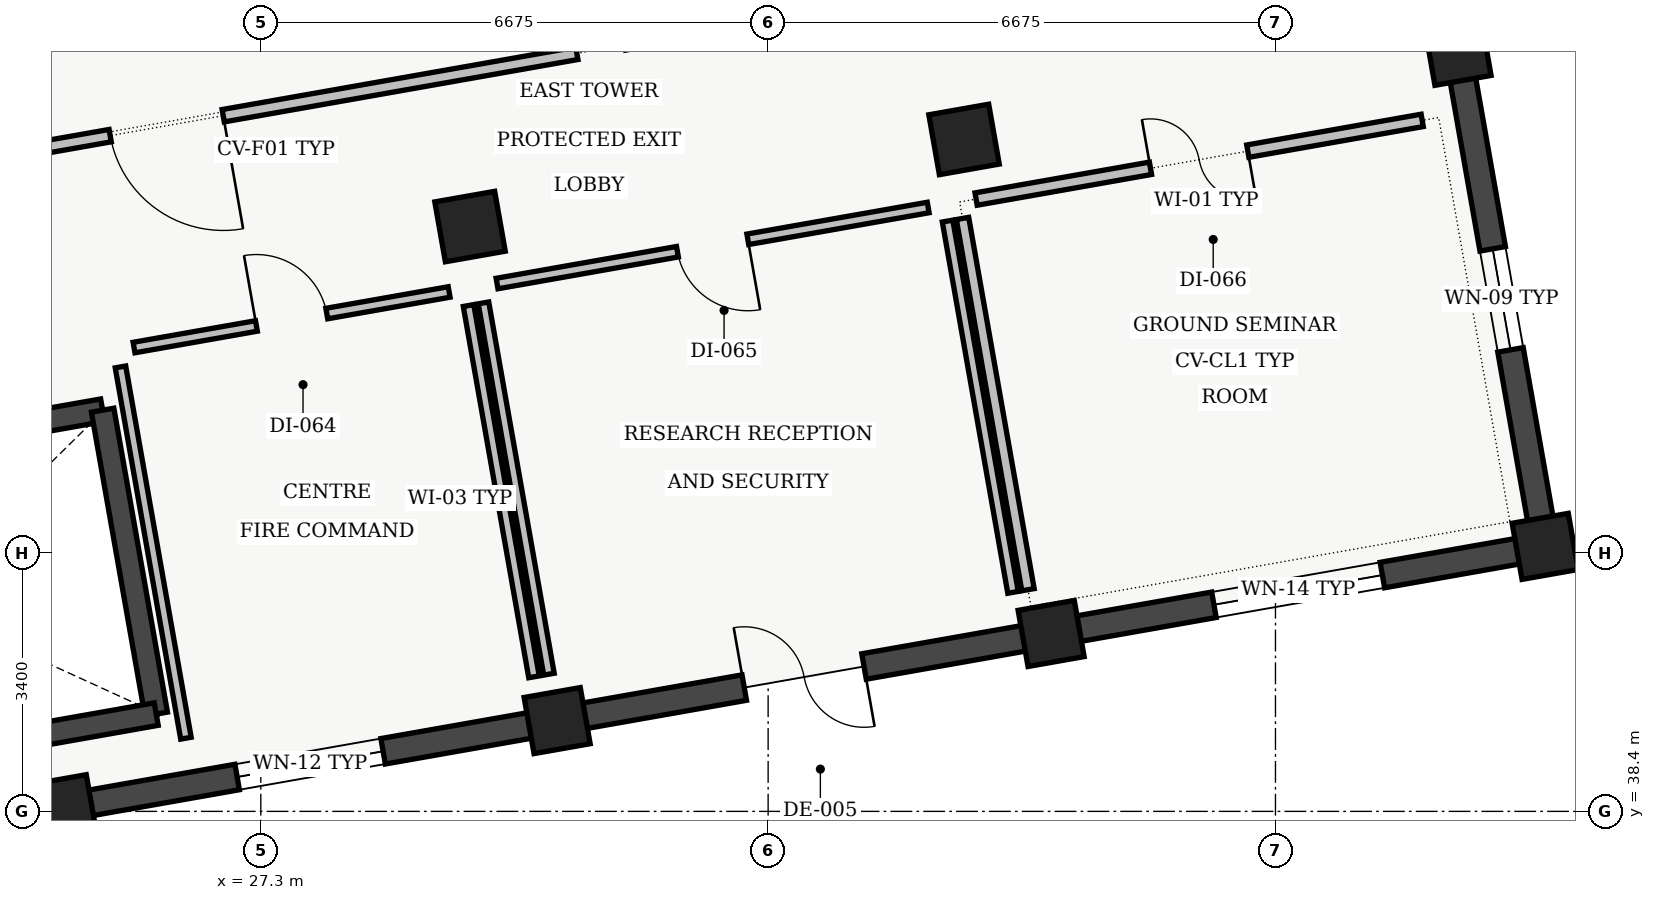
"""IFC4 building model, lengths in metres.
Left out: names, types, materials, properties, quantities, classifications, styles, units other than length and angle.
Written with IfcOpenShell. Run it as: python <this file> out.ifc"""

import sys

from ifc_helpers import new_model, si_unit, direction, frame, frame_2d, origin, origin_2d, place, context, subcontext, project, spatial, rectangle, extrude, element, fill, save


model = new_model("IFC4")
c1 = context("Model", 3, precision=1e-05, world=origin(), true_north=direction((0.0, 1.0)))
c2 = subcontext(c1, "Body", "Model", "MODEL_VIEW")
j1 = project(units=[si_unit("LENGTHUNIT", "METRE"), si_unit("PLANEANGLEUNIT", "RADIAN")], contexts=[c1])
p1 = place(None, origin())
s1 = spatial("IfcSite", under=j1, at=p1, CompositionType="ELEMENT")
p2 = place(p1, origin())
s2 = spatial("IfcBuilding", under=s1, at=p2, CompositionType="ELEMENT")
p3 = place(p2, origin())
s3 = spatial("IfcBuildingStorey", under=s2, at=p3, CompositionType="ELEMENT", Elevation=0.0)
for number, where, z_axis, x_axis in (
    (1, (24.699, 38.448, 0.0), (0.0, 0.0, 1.0), (0.985, 0.174, 0.0)),
    (2, (31.199, 39.594, 0.0), (0.0, 0.0, 1.0), (0.985, 0.174, 0.0)),
):
    element("IfcColumn", number, at=place(p3, frame(where, z_axis=z_axis, x_axis=x_axis)), inside=s3, PredefinedType="COLUMN", context=c2, shape_type="SweptSolid", body=[
        extrude(rectangle(XDim=0.75, YDim=0.75, at=origin_2d()), origin(), (0.0, 0.0, 1.0), 4.92),
    ])
p4 = place(p3, frame((30.053, 46.094, 0.0), z_axis=(0.0, 0.0, 1.0), x_axis=(0.984807753012, 0.173648177667, 0.0)))
e3 = element("IfcColumn", 3, at=p4, inside=s3, PredefinedType="COLUMN", context=c2, shape_type="SweptSolid", body=[
    extrude(rectangle(XDim=0.8, YDim=0.8, at=origin_2d()), origin(), (0.0, 0.0, 1.0), 4.92),
])
p5 = place(p3, frame((37.699, 40.74, 0.0), z_axis=(0.0, 0.0, 1.0), x_axis=(0.984807753012, 0.173648177667, 0.0)))
e4 = element("IfcColumn", 4, at=p5, inside=s3, PredefinedType="COLUMN", context=c2, shape_type="SweptSolid", body=[
    extrude(rectangle(XDim=0.75, YDim=0.75, at=origin_2d()), origin(), (0.0, 0.0, 1.0), 4.92),
])
p6 = place(p3, frame((36.552, 47.24, 0.0), z_axis=(0.0, 0.0, 1.0), x_axis=(0.984807753012, 0.173648177667, 0.0)))
e5 = element("IfcColumn", 5, at=p6, inside=s3, PredefinedType="COLUMN", context=c2, shape_type="SweptSolid", body=[
    extrude(rectangle(XDim=0.8, YDim=0.8, at=origin_2d()), origin(), (0.0, 0.0, 1.0), 4.92),
])
for number, where, z_axis, x_axis in (
    (6, (44.198, 41.886, 0.0), (0.0, 0.0, 1.0), (0.985, 0.174, 0.0)),
    (7, (43.052, 48.386, 0.0), (0.0, 0.0, 1.0), (0.985, 0.174, 0.0)),
):
    element("IfcColumn", number, at=place(p3, frame(where, z_axis=z_axis, x_axis=x_axis)), inside=s3, PredefinedType="COLUMN", context=c2, shape_type="SweptSolid", body=[
        extrude(rectangle(XDim=0.75, YDim=0.75, at=origin_2d()), origin(), (0.0, 0.0, 1.0), 4.92),
    ])
p7 = place(p3, frame((43.116, 48.022, 0.0), z_axis=(0.0, 0.0, 1.0), x_axis=(0.1736474839, -0.984807875342, 0.0)))
e8 = element("IfcWall", 8, at=p7, inside=s3, PredefinedType="SOLIDWALL", context=c2, shape_type="SweptSolid", body=[
    extrude(rectangle(XDim=5.86, YDim=0.34, at=frame_2d((2.93, 0.0))), origin(), (0.0, 0.0, 1.0), 4.455),
])
p8 = place(p7, frame((2.255, 0.0, 0.95)))
e9 = element("IfcOpeningElement", 9, at=p8, cuts=e8, PredefinedType="OPENING", context=c2, shape_type="SweptSolid", body=[
    extrude(rectangle(XDim=1.35, YDim=1.8, at=frame_2d((0.675, 0.9))), frame((0.0, 0.17, 0.0), z_axis=(0.0, -1.0, 0.0), x_axis=(1.0, 0.0, 0.0)), (0.0, 0.0, 1.0), 0.34),
])
p9 = place(p3, frame((43.834, 41.822, 0.0), z_axis=(0.0, 0.0, 1.0), x_axis=(-0.984807875342, -0.1736474839, 0.0)))
e10 = element("IfcWall", 10, at=p9, inside=s3, PredefinedType="SOLIDWALL", context=c2, shape_type="SweptSolid", body=[
    extrude(rectangle(XDim=5.86, YDim=0.34, at=frame_2d((2.93, 0.0))), origin(), (0.0, 0.0, 1.0), 4.455),
])
p10 = place(p9, frame((1.805, 0.0, 0.95)))
e11 = element("IfcOpeningElement", 11, at=p10, cuts=e10, PredefinedType="OPENING", context=c2, shape_type="SweptSolid", body=[
    extrude(rectangle(XDim=2.25, YDim=1.55, at=frame_2d((1.125, 0.775))), frame((0.0, 0.17, 0.0), z_axis=(0.0, -1.0, 0.0), x_axis=(1.0, 0.0, 0.0)), (0.0, 0.0, 1.0), 0.34),
])
p11 = place(p3, frame((37.334, 40.676, 0.0), z_axis=(0.0, 0.0, 1.0), x_axis=(-0.984807875342, -0.1736474839, 0.0)))
e12 = element("IfcWall", 12, at=p11, inside=s3, PredefinedType="SOLIDWALL", context=c2, shape_type="SweptSolid", body=[
    extrude(rectangle(XDim=5.86, YDim=0.34, at=frame_2d((2.93, 0.0))), origin(), (0.0, 0.0, 1.0), 4.455),
])
p12 = place(p11, frame((2.13, 0.0, 0.0)))
e13 = element("IfcOpeningElement", 13, at=p12, cuts=e12, PredefinedType="OPENING", context=c2, shape_type="SweptSolid", body=[
    extrude(rectangle(XDim=1.6, YDim=2.2, at=frame_2d((0.8, 1.1))), frame((0.0, 0.17, 0.0), z_axis=(0.0, -1.0, 0.0), x_axis=(1.0, 0.0, 0.0)), (0.0, 0.0, 1.0), 0.34),
])
p13 = place(p3, frame((30.834, 39.53, 0.0), z_axis=(0.0, 0.0, 1.0), x_axis=(-0.984807875342, -0.1736474839, 0.0)))
e14 = element("IfcWall", 14, at=p13, inside=s3, PredefinedType="SOLIDWALL", context=c2, shape_type="SweptSolid", body=[
    extrude(rectangle(XDim=5.86, YDim=0.34, at=frame_2d((2.93, 0.0))), origin(), (0.0, 0.0, 1.0), 4.455),
])
p14 = place(p13, frame((1.955, 0.0, 0.95)))
e15 = element("IfcOpeningElement", 15, at=p14, cuts=e14, PredefinedType="OPENING", context=c2, shape_type="SweptSolid", body=[
    extrude(rectangle(XDim=1.95, YDim=1.5, at=frame_2d((0.975, 0.75))), frame((0.0, 0.17, 0.0), z_axis=(0.0, -1.0, 0.0), x_axis=(1.0, 0.0, 0.0)), (0.0, 0.0, 1.0), 0.34),
])
p15 = place(p3, frame((17.863, 42.381, 0.0), z_axis=(0.0, 0.0, 1.0), x_axis=(0.984808225754, 0.173645496596, 0.0)))
e16 = element("IfcWall", 16, at=p15, inside=s3, PredefinedType="SHEAR", context=c2, shape_type="SweptSolid", body=[
    extrude(rectangle(XDim=7.47, YDim=0.3, at=frame_2d((3.735, 0.0))), origin(), (0.0, 0.0, 1.0), 4.88),
])
p16 = place(p15, frame((0.18, 0.0, 0.0)))
e17 = element("IfcOpeningElement", 17, at=p16, cuts=e16, PredefinedType="OPENING", context=c2, shape_type="SweptSolid", body=[
    extrude(rectangle(XDim=1.24, YDim=2.15, at=frame_2d((0.62, 1.075))), frame((0.0, 0.15, 0.0), z_axis=(0.0, -1.0, 0.0), x_axis=(1.0, 0.0, 0.0)), (0.0, 0.0, 1.0), 0.3),
])
p17 = place(p3, frame((25.219, 43.678, 0.0), z_axis=(0.0, 0.0, 1.0), x_axis=(0.173665267602, -0.984804739443, 0.0)))
e18 = element("IfcWall", 18, at=p17, inside=s3, PredefinedType="SHEAR", context=c2, shape_type="SweptSolid", body=[
    extrude(rectangle(XDim=4.06, YDim=0.3, at=frame_2d((2.03, 0.0))), origin(), (0.0, 0.0, 1.0), 4.88),
])
p18 = place(p3, frame((25.924, 39.68, 0.0), z_axis=(0.0, 0.0, 1.0), x_axis=(-0.984809211193, -0.173639907711, 0.0)))
e19 = element("IfcWall", 19, at=p18, inside=s3, PredefinedType="SHEAR", context=c2, shape_type="SweptSolid", body=[
    extrude(rectangle(XDim=7.47, YDim=0.3, at=frame_2d((3.735, 0.0))), origin(), (0.0, 0.0, 1.0), 4.88),
])
p19 = place(p3, frame((30.894, 40.17, 0.0), z_axis=(0.0, 0.0, 1.0), x_axis=(-0.173658971256, 0.98480584975, 0.0)))
e20 = element("IfcWall", 20, at=p19, inside=s3, PredefinedType="PARTITIONING", context=c2, shape_type="SweptSolid", body=[
    extrude(rectangle(XDim=4.96, YDim=0.14, at=frame_2d((2.48, 0.0))), origin(), (0.0, 0.0, 1.0), 4.255),
])
p20 = place(p3, frame((29.778, 45.233, 0.0), z_axis=(0.0, 0.0, 1.0), x_axis=(-0.984811568751, -0.173626536147, 0.0)))
e21 = element("IfcWall", 21, at=p20, inside=s3, PredefinedType="PARTITIONING", context=c2, shape_type="SweptSolid", body=[
    extrude(rectangle(XDim=4.21, YDim=0.14, at=frame_2d((2.105, 0.0))), origin(), (0.0, 0.0, 1.0), 4.55),
])
p21 = place(p20, frame((1.635, 0.0, 0.0)))
e22 = element("IfcOpeningElement", 22, at=p21, cuts=e21, PredefinedType="OPENING", context=c2, shape_type="SweptSolid", body=[
    extrude(rectangle(XDim=0.94, YDim=2.12, at=frame_2d((0.47, 1.06))), frame((0.0, 0.07, 0.0), z_axis=(0.0, -1.0, 0.0), x_axis=(1.0, 0.0, 0.0)), (0.0, 0.0, 1.0), 0.14),
])
p22 = place(p3, frame((25.454, 44.247, 0.0), z_axis=(0.0, 0.0, 1.0), x_axis=(0.173658971256, -0.98480584975, 0.0)))
e23 = element("IfcWall", 23, at=p22, inside=s3, PredefinedType="PARTITIONING", context=c2, shape_type="SweptSolid", body=[
    extrude(rectangle(XDim=4.96, YDim=0.14, at=frame_2d((2.48, 0.0))), origin(), (0.0, 0.0, 1.0), 4.55),
])
p23 = place(p3, frame((37.197, 41.281, 0.0), z_axis=(0.0, 0.0, 1.0), x_axis=(-0.173650553511, 0.984807334084, 0.0)))
e24 = element("IfcWall", 24, at=p23, inside=s3, PredefinedType="PARTITIONING", context=c2, shape_type="SweptSolid", body=[
    extrude(rectangle(XDim=4.96, YDim=0.14, at=frame_2d((2.48, 0.0))), origin(), (0.0, 0.0, 1.0), 4.55),
])
p24 = place(p3, frame((36.081, 46.345, 0.0), z_axis=(0.0, 0.0, 1.0), x_axis=(-0.984806166054, -0.173657177512, 0.0)))
e25 = element("IfcWall", 25, at=p24, inside=s3, PredefinedType="PARTITIONING", context=c2, shape_type="SweptSolid", body=[
    extrude(rectangle(XDim=5.76, YDim=0.14, at=frame_2d((2.88, 0.0))), origin(), (0.0, 0.0, 1.0), 4.55),
])
p25 = place(p24, frame((2.41, 0.0, 0.0)))
e26 = element("IfcOpeningElement", 26, at=p25, cuts=e25, PredefinedType="OPENING", context=c2, shape_type="SweptSolid", body=[
    extrude(rectangle(XDim=0.94, YDim=2.12, at=frame_2d((0.47, 1.06))), frame((0.0, 0.07, 0.0), z_axis=(0.0, -1.0, 0.0), x_axis=(1.0, 0.0, 0.0)), (0.0, 0.0, 1.0), 0.14),
])
p26 = place(p3, frame((30.23, 45.09, 0.0), z_axis=(0.0, 0.0, 1.0), x_axis=(0.173650553511, -0.984807334084, 0.0)))
e27 = element("IfcWall", 27, at=p26, inside=s3, PredefinedType="PARTITIONING", context=c2, shape_type="SweptSolid", body=[
    extrude(rectangle(XDim=4.96, YDim=0.14, at=frame_2d((2.48, 0.0))), origin(), (0.0, 0.0, 1.0), 4.255),
])
p27 = place(p3, frame((42.581, 47.491, 0.0), z_axis=(0.0, 0.0, 1.0), x_axis=(-0.98480829201, -0.173645120828, 0.0)))
e28 = element("IfcWall", 28, at=p27, inside=s3, PredefinedType="PARTITIONING", context=c2, shape_type="SweptSolid", body=[
    extrude(rectangle(XDim=5.96, YDim=0.165, at=frame_2d((2.98, 0.0))), origin(), (0.0, 0.0, 1.0), 4.55),
])
p28 = place(p27, frame((2.33, 0.0, 0.0)))
e29 = element("IfcOpeningElement", 29, at=p28, cuts=e28, PredefinedType="OPENING", context=c2, shape_type="SweptSolid", body=[
    extrude(rectangle(XDim=1.3, YDim=2.18, at=frame_2d((0.65, 1.09))), frame((0.0, 0.083, 0.0), z_axis=(0.0, -1.0, 0.0), x_axis=(1.0, 0.0, 0.0)), (0.0, 0.0, 1.0), 0.165),
])
p29 = place(p3, frame((36.533, 46.201, 0.0), z_axis=(0.0, 0.0, 1.0), x_axis=(0.173650553511, -0.984807334084, 0.0)))
e30 = element("IfcWall", 30, at=p29, inside=s3, PredefinedType="PARTITIONING", context=c2, shape_type="SweptSolid", body=[
    extrude(rectangle(XDim=4.96, YDim=0.165, at=frame_2d((2.48, 0.0))), origin(), (0.0, 0.0, 1.0), 4.255),
])
p30 = place(p3, frame((20.665, 46.469, 0.0), z_axis=(0.0, 0.0, 1.0), x_axis=(0.98480552757, 0.173660798302, 0.0)))
e31 = element("IfcWall", 31, at=p30, inside=s3, PredefinedType="PARTITIONING", context=c2, shape_type="SweptSolid", body=[
    extrude(rectangle(XDim=10.96, YDim=0.165, at=frame_2d((5.48, 0.0))), origin(), (0.0, 0.0, 1.0), 4.505),
])
p31 = place(p30, frame((4.725, 0.0, 0.0)))
e32 = element("IfcOpeningElement", 32, at=p31, cuts=e31, PredefinedType="OPENING", context=c2, shape_type="SweptSolid", body=[
    extrude(rectangle(XDim=1.51, YDim=2.12, at=frame_2d((0.755, 1.06))), frame((0.0, 0.083, 0.0), z_axis=(0.0, -1.0, 0.0), x_axis=(1.0, 0.0, 0.0)), (0.0, 0.0, 1.0), 0.165),
])
p32 = place(p8, origin())
e33 = element("IfcWindow", 33, at=p32, inside=s3, PartitioningType="SINGLE_PANEL", PredefinedType="WINDOW", context=c2, shape_type="SweptSolid", body=[
    extrude(rectangle(XDim=1.35, YDim=1.8, at=frame_2d((0.675, 0.9))), frame((0.0, 0.03, 0.0), z_axis=(0.0, -1.0, 0.0), x_axis=(1.0, 0.0, 0.0)), (0.0, 0.0, 1.0), 0.06),
])
fill(e9, e33)
p33 = place(p10, origin())
e34 = element("IfcWindow", 34, at=p33, inside=s3, PartitioningType="SINGLE_PANEL", PredefinedType="WINDOW", context=c2, shape_type="SweptSolid", body=[
    extrude(rectangle(XDim=2.25, YDim=1.55, at=frame_2d((1.125, 0.775))), frame((0.0, 0.03, 0.0), z_axis=(0.0, -1.0, 0.0), x_axis=(1.0, 0.0, 0.0)), (0.0, 0.0, 1.0), 0.06),
])
fill(e11, e34)
p34 = place(p12, origin())
e35 = element("IfcDoor", 35, at=p34, inside=s3, OperationType="DOUBLE_DOOR_SINGLE_SWING", PredefinedType="DOOR", context=c2, shape_type="SweptSolid", body=[
    extrude(rectangle(XDim=1.6, YDim=2.2, at=frame_2d((0.8, 1.1))), frame((0.0, 0.025, 0.0), z_axis=(0.0, -1.0, 0.0), x_axis=(1.0, 0.0, 0.0)), (0.0, 0.0, 1.0), 0.05),
])
fill(e13, e35)
p35 = place(p14, origin())
e36 = element("IfcWindow", 36, at=p35, inside=s3, PartitioningType="SINGLE_PANEL", PredefinedType="WINDOW", context=c2, shape_type="SweptSolid", body=[
    extrude(rectangle(XDim=1.95, YDim=1.5, at=frame_2d((0.975, 0.75))), frame((0.0, 0.03, 0.0), z_axis=(0.0, -1.0, 0.0), x_axis=(1.0, 0.0, 0.0)), (0.0, 0.0, 1.0), 0.06),
])
fill(e15, e36)
p36 = place(p21, origin())
e37 = element("IfcDoor", 37, at=p36, inside=s3, OperationType="SINGLE_SWING_RIGHT", PredefinedType="DOOR", context=c2, shape_type="SweptSolid", body=[
    extrude(rectangle(XDim=0.94, YDim=2.12, at=frame_2d((0.47, 1.06))), frame((0.0, 0.025, 0.0), z_axis=(0.0, -1.0, 0.0), x_axis=(1.0, 0.0, 0.0)), (0.0, 0.0, 1.0), 0.05),
])
fill(e22, e37)
p37 = place(p25, origin())
e38 = element("IfcDoor", 38, at=p37, inside=s3, OperationType="SINGLE_SWING_LEFT", PredefinedType="DOOR", context=c2, shape_type="SweptSolid", body=[
    extrude(rectangle(XDim=0.94, YDim=2.12, at=frame_2d((0.47, 1.06))), frame((0.0, 0.025, 0.0), z_axis=(0.0, -1.0, 0.0), x_axis=(1.0, 0.0, 0.0)), (0.0, 0.0, 1.0), 0.05),
])
fill(e26, e38)
p38 = place(p28, origin())
e39 = element("IfcDoor", 39, at=p38, inside=s3, OperationType="DOUBLE_DOOR_SINGLE_SWING", PredefinedType="DOOR", context=c2, shape_type="SweptSolid", body=[
    extrude(rectangle(XDim=1.3, YDim=2.18, at=frame_2d((0.65, 1.09))), frame((0.0, 0.025, 0.0), z_axis=(0.0, -1.0, 0.0), x_axis=(1.0, 0.0, 0.0)), (0.0, 0.0, 1.0), 0.05),
])
fill(e29, e39)
p39 = place(p31, origin())
e40 = element("IfcDoor", 40, at=p39, inside=s3, OperationType="SINGLE_SWING_RIGHT", PredefinedType="DOOR", context=c2, shape_type="SweptSolid", body=[
    extrude(rectangle(XDim=1.51, YDim=2.12, at=frame_2d((0.755, 1.06))), frame((0.0, 0.025, 0.0), z_axis=(0.0, -1.0, 0.0), x_axis=(1.0, 0.0, 0.0)), (0.0, 0.0, 1.0), 0.05),
])
fill(e32, e40)
save(model, sys.argv[1])
